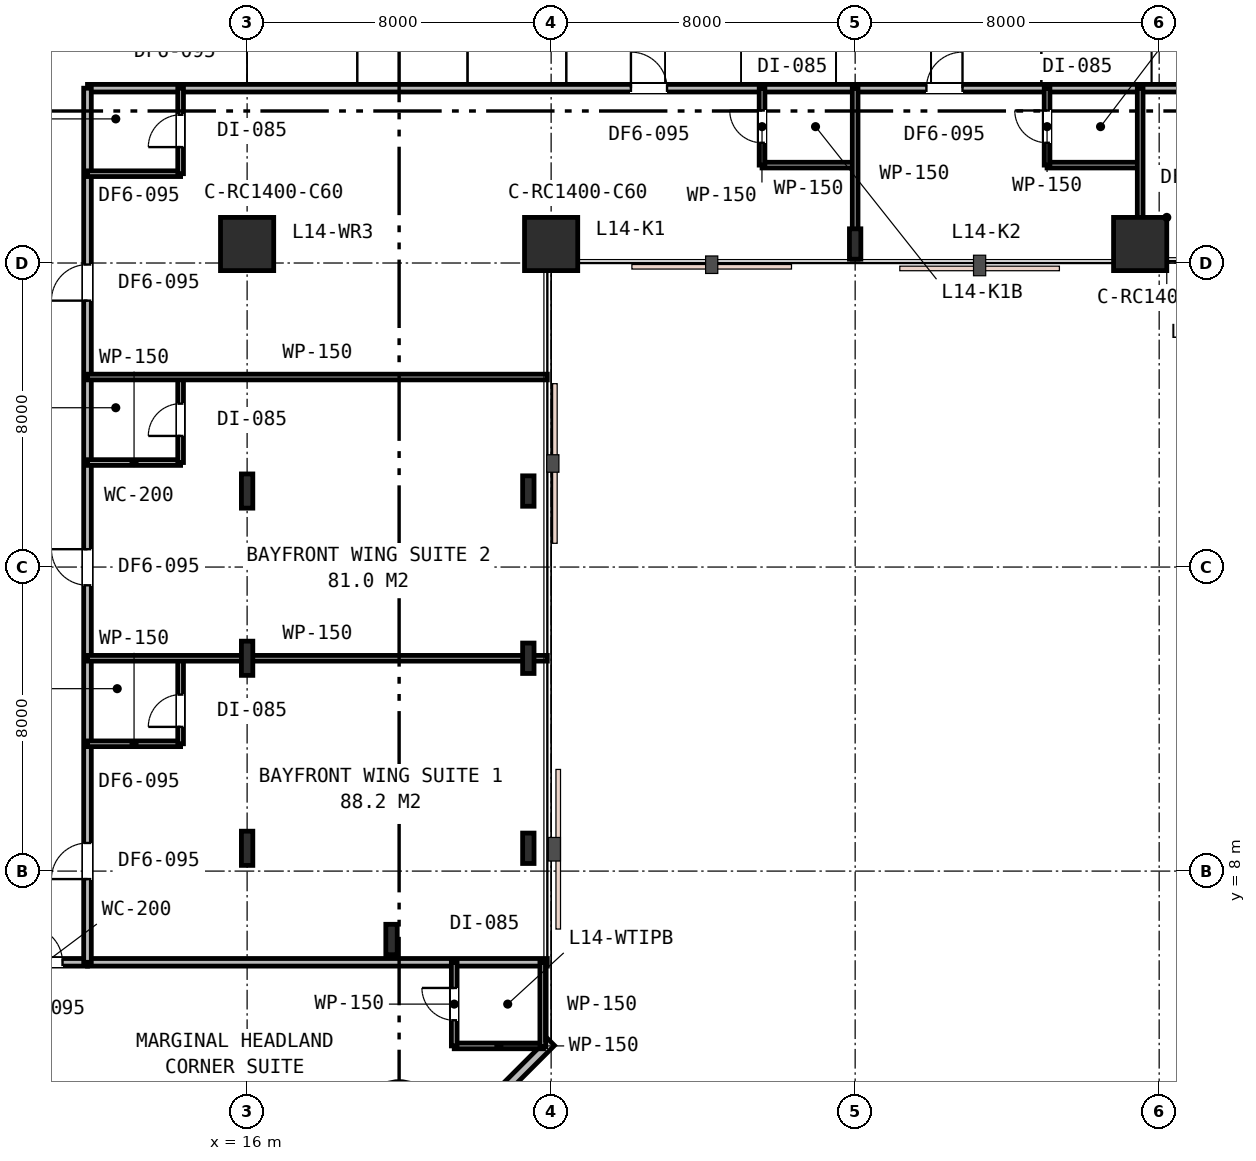
"""IFC4 building model, lengths in metres.
Left out: names, types, materials, properties, quantities, classifications, styles, units other than length and angle.
Written with IfcOpenShell. Run it as: python <this file> out.ifc"""

import sys

from ifc_helpers import new_model, si_unit, direction, frame, frame_2d, origin, origin_2d, place, context, subcontext, project, spatial, rectangle, i_section, extrude, element, fill, save


model = new_model("IFC4")
c1 = context("Model", 3, precision=1e-05, world=origin(), true_north=direction((0.0, 1.0)))
c2 = subcontext(c1, "Body", "Model", "MODEL_VIEW")
j1 = project(units=[si_unit("LENGTHUNIT", "METRE"), si_unit("PLANEANGLEUNIT", "RADIAN")], contexts=[c1])
p1 = place(None, origin())
s1 = spatial("IfcSite", under=j1, at=p1, CompositionType="ELEMENT")
p2 = place(p1, origin())
s2 = spatial("IfcBuilding", under=s1, at=p2, CompositionType="ELEMENT")
p3 = place(p2, frame((0.0, 0.0, 58.2)))
s3 = spatial("IfcBuildingStorey", under=s2, at=p3, CompositionType="ELEMENT", Elevation=58.2)
for number, where, z_axis, x_axis in (
    (1, (16.0, 24.5, 0.0), (0.0, 0.0, 1.0), (1.0, 0.0, 0.0)),
    (2, (24.0, 24.5, 0.0), (0.0, 0.0, 1.0), (1.0, 0.0, 0.0)),
):
    element("IfcColumn", number, at=place(p3, frame(where, z_axis=z_axis, x_axis=x_axis)), inside=s3, PredefinedType="COLUMN", context=c2, shape_type="SweptSolid", body=[
        extrude(rectangle(XDim=1.4, YDim=1.4, at=origin_2d()), origin(), (0.0, 0.0, 1.0), 3.6),
    ])
p4 = place(p3, frame((32.0, 24.5, 0.0), z_axis=(0.0, 0.0, 1.0), x_axis=(1.0, 0.0, 0.0)))
e3 = element("IfcColumn", 3, at=p4, inside=s3, PredefinedType="COLUMN", context=c2, shape_type="SweptSolid", body=[
    extrude(i_section(OverallWidth=0.3, OverallDepth=0.8, WebThickness=0.018, FlangeThickness=0.033, FilletRadius=0.03, at=origin_2d()), origin(), (0.0, 0.0, 1.0), 3.6),
])
p5 = place(p3, frame((39.5, 24.5, 0.0), z_axis=(0.0, 0.0, 1.0), x_axis=(1.0, 0.0, 0.0)))
e4 = element("IfcColumn", 4, at=p5, inside=s3, PredefinedType="COLUMN", context=c2, shape_type="SweptSolid", body=[
    extrude(rectangle(XDim=1.4, YDim=1.4, at=origin_2d()), origin(), (0.0, 0.0, 1.0), 3.6),
])
for number, where, z_axis, x_axis in (
    (5, (19.8, 6.2, 0.0), (0.0, 0.0, 1.0), (1.0, 0.0, 0.0)),
    (6, (23.4, 8.6, 0.0), (0.0, 0.0, 1.0), (1.0, 0.0, 0.0)),
    (7, (23.4, 13.6, 0.0), (0.0, 0.0, 1.0), (1.0, 0.0, 0.0)),
    (8, (23.4, 18.0, 0.0), (0.0, 0.0, 1.0), (1.0, 0.0, 0.0)),
):
    element("IfcColumn", number, at=place(p3, frame(where, z_axis=z_axis, x_axis=x_axis)), inside=s3, PredefinedType="COLUMN", context=c2, shape_type="SweptSolid", body=[
        extrude(i_section(OverallWidth=0.3, OverallDepth=0.8, WebThickness=0.018, FlangeThickness=0.033, FilletRadius=0.03, at=origin_2d()), origin(), (0.0, 0.0, 1.0), 3.6),
    ])
for number, where, z_axis, x_axis in (
    (9, (16.0, 8.6, 0.0), (0.0, 0.0, 1.0), (1.0, 0.0, 0.0)),
    (10, (16.0, 13.6, 0.0), (0.0, 0.0, 1.0), (1.0, 0.0, 0.0)),
    (11, (16.0, 18.0, 0.0), (0.0, 0.0, 1.0), (1.0, 0.0, 0.0)),
):
    element("IfcColumn", number, at=place(p3, frame(where, z_axis=z_axis, x_axis=x_axis)), inside=s3, PredefinedType="COLUMN", context=c2, shape_type="SweptSolid", body=[
        extrude(i_section(OverallWidth=0.3, OverallDepth=0.9, WebThickness=0.018, FlangeThickness=0.035, FilletRadius=0.03, at=origin_2d()), origin(), (0.0, 0.0, 1.0), 3.6),
    ])
p6 = place(p3, frame((20.5, 0.0, 0.0), z_axis=(0.0, 0.0, 1.0), x_axis=(0.707106781187, 0.707106781187, 0.0)))
e12 = element("IfcWall", 12, at=p6, inside=s3, PredefinedType="STANDARD", context=c2, shape_type="SweptSolid", body=[
    extrude(rectangle(XDim=4.95, YDim=0.25, at=frame_2d((2.475, 0.0))), origin(), (0.0, 0.0, 1.0), 3.33),
])
p7 = place(p6, frame((1.465, 0.0, 0.75)))
e13 = element("IfcOpeningElement", 13, at=p7, cuts=e12, PredefinedType="OPENING", context=c2, shape_type="SweptSolid", body=[
    extrude(rectangle(XDim=1.8, YDim=1.85, at=frame_2d((0.9, 0.925))), frame((0.0, 0.135, 0.0), z_axis=(0.0, -1.0, 0.0), x_axis=(1.0, 0.0, 0.0)), (0.0, 0.0, 1.0), 0.27),
])
p8 = place(p3, frame((11.8, 28.6, 0.0), z_axis=(0.0, 0.0, 1.0), x_axis=(1.0, 0.0, 0.0)))
e14 = element("IfcWall", 14, at=p8, inside=s3, PredefinedType="PARTITIONING", context=c2, shape_type="SweptSolid", body=[
    extrude(rectangle(XDim=38.6, YDim=0.2, at=frame_2d((19.3, 0.0))), origin(), (0.0, 0.0, 1.0), 2.82),
])
p9 = place(p8, frame((14.3, 0.0, 0.0)))
e15 = element("IfcOpeningElement", 15, at=p9, cuts=e14, PredefinedType="OPENING", context=c2, shape_type="SweptSolid", body=[
    extrude(rectangle(XDim=0.95, YDim=2.15, at=frame_2d((0.475, 1.075))), frame((0.0, 0.11, 0.0), z_axis=(0.0, -1.0, 0.0), x_axis=(1.0, 0.0, 0.0)), (0.0, 0.0, 1.0), 0.22),
])
p10 = place(p8, frame((22.075, 0.0, 0.0)))
e16 = element("IfcOpeningElement", 16, at=p10, cuts=e14, PredefinedType="OPENING", context=c2, shape_type="SweptSolid", body=[
    extrude(rectangle(XDim=0.95, YDim=2.15, at=frame_2d((0.475, 1.075))), frame((0.0, 0.11, 0.0), z_axis=(0.0, -1.0, 0.0), x_axis=(1.0, 0.0, 0.0)), (0.0, 0.0, 1.0), 0.22),
])
p11 = place(p8, frame((28.829, 0.0, 0.0)))
e17 = element("IfcOpeningElement", 17, at=p11, cuts=e14, PredefinedType="OPENING", context=c2, shape_type="SweptSolid", body=[
    extrude(rectangle(XDim=0.95, YDim=2.15, at=frame_2d((0.475, 1.075))), frame((0.0, 0.11, 0.0), z_axis=(0.0, -1.0, 0.0), x_axis=(1.0, 0.0, 0.0)), (0.0, 0.0, 1.0), 0.22),
])
p12 = place(p8, frame((34.669, 0.0, 0.0)))
e18 = element("IfcOpeningElement", 18, at=p12, cuts=e14, PredefinedType="OPENING", context=c2, shape_type="SweptSolid", body=[
    extrude(rectangle(XDim=0.95, YDim=2.15, at=frame_2d((0.475, 1.075))), frame((0.0, 0.11, 0.0), z_axis=(0.0, -1.0, 0.0), x_axis=(1.0, 0.0, 0.0)), (0.0, 0.0, 1.0), 0.22),
])
p13 = place(p3, frame((29.55, 26.576, 0.0), z_axis=(0.0, 0.0, 1.0), x_axis=(1.0, 0.0, 0.0)))
e19 = element("IfcWall", 19, at=p13, inside=s3, PredefinedType="PARTITIONING", context=c2, shape_type="SweptSolid", body=[
    extrude(rectangle(XDim=2.45, YDim=0.15, at=frame_2d((1.225, 0.0))), origin(), (0.0, 0.0, 1.0), 3.33),
])
p14 = place(p3, frame((29.55, 26.576, 0.0), z_axis=(0.0, 0.0, 1.0), x_axis=(0.0, 1.0, 0.0)))
e20 = element("IfcWall", 20, at=p14, inside=s3, PredefinedType="PARTITIONING", context=c2, shape_type="SweptSolid", body=[
    extrude(rectangle(XDim=2.024, YDim=0.15, at=frame_2d((1.012, 0.0))), origin(), (0.0, 0.0, 1.0), 3.33),
])
p15 = place(p14, frame((0.587, 0.0, 0.0)))
e21 = element("IfcOpeningElement", 21, at=p15, cuts=e20, PredefinedType="OPENING", context=c2, shape_type="SweptSolid", body=[
    extrude(rectangle(XDim=0.85, YDim=2.15, at=frame_2d((0.425, 1.075))), frame((0.0, 0.085, 0.0), z_axis=(0.0, -1.0, 0.0), x_axis=(1.0, 0.0, 0.0)), (0.0, 0.0, 1.0), 0.17),
])
p16 = place(p3, frame((32.0, 28.6, 0.0), z_axis=(0.0, 0.0, 1.0), x_axis=(0.0, -1.0, 0.0)))
e22 = element("IfcWall", 22, at=p16, inside=s3, PredefinedType="PARTITIONING", context=c2, shape_type="SweptSolid", body=[
    extrude(rectangle(XDim=4.5, YDim=0.15, at=frame_2d((2.25, 0.0))), origin(), (0.0, 0.0, 1.0), 2.93),
])
p17 = place(p3, frame((37.05, 26.576, 0.0), z_axis=(0.0, 0.0, 1.0), x_axis=(1.0, 0.0, 0.0)))
e23 = element("IfcWall", 23, at=p17, inside=s3, PredefinedType="PARTITIONING", context=c2, shape_type="SweptSolid", body=[
    extrude(rectangle(XDim=2.45, YDim=0.15, at=frame_2d((1.225, 0.0))), origin(), (0.0, 0.0, 1.0), 2.82),
])
p18 = place(p3, frame((37.05, 26.576, 0.0), z_axis=(0.0, 0.0, 1.0), x_axis=(0.0, 1.0, 0.0)))
e24 = element("IfcWall", 24, at=p18, inside=s3, PredefinedType="PARTITIONING", context=c2, shape_type="SweptSolid", body=[
    extrude(rectangle(XDim=2.024, YDim=0.15, at=frame_2d((1.012, 0.0))), origin(), (0.0, 0.0, 1.0), 2.96),
])
p19 = place(p18, frame((0.587, 0.0, 0.0)))
e25 = element("IfcOpeningElement", 25, at=p19, cuts=e24, PredefinedType="OPENING", context=c2, shape_type="SweptSolid", body=[
    extrude(rectangle(XDim=0.85, YDim=2.15, at=frame_2d((0.425, 1.075))), frame((0.0, 0.085, 0.0), z_axis=(0.0, -1.0, 0.0), x_axis=(1.0, 0.0, 0.0)), (0.0, 0.0, 1.0), 0.17),
])
p20 = place(p3, frame((39.5, 28.6, 0.0), z_axis=(0.0, 0.0, 1.0), x_axis=(0.0, -1.0, 0.0)))
e26 = element("IfcWall", 26, at=p20, inside=s3, PredefinedType="PARTITIONING", context=c2, shape_type="SweptSolid", body=[
    extrude(rectangle(XDim=4.5, YDim=0.15, at=frame_2d((2.25, 0.0))), origin(), (0.0, 0.0, 1.0), 2.82),
])
p21 = place(p3, frame((11.8, 5.6, 0.0), z_axis=(0.0, 0.0, 1.0), x_axis=(1.0, 0.0, 0.0)))
e27 = element("IfcWall", 27, at=p21, inside=s3, PredefinedType="PARTITIONING", context=c2, shape_type="SweptSolid", body=[
    extrude(rectangle(XDim=12.1, YDim=0.2, at=frame_2d((6.05, 0.0))), origin(), (0.0, 0.0, 1.0), 2.82),
])
p22 = place(p3, frame((9.6, 5.6, 0.0), z_axis=(0.0, 0.0, 1.0), x_axis=(1.0, 0.0, 0.0)))
e28 = element("IfcWall", 28, at=p22, inside=s3, PredefinedType="PARTITIONING", context=c2, shape_type="SweptSolid", body=[
    extrude(rectangle(XDim=2.2, YDim=0.2, at=frame_2d((1.1, 0.0))), origin(), (0.0, 0.0, 1.0), 3.33),
])
p23 = place(p22, frame((0.593, 0.0, 0.0)))
e29 = element("IfcOpeningElement", 29, at=p23, cuts=e28, PredefinedType="OPENING", context=c2, shape_type="SweptSolid", body=[
    extrude(rectangle(XDim=0.95, YDim=2.15, at=frame_2d((0.475, 1.075))), frame((0.0, 0.11, 0.0), z_axis=(0.0, -1.0, 0.0), x_axis=(1.0, 0.0, 0.0)), (0.0, 0.0, 1.0), 0.22),
])
p24 = place(p3, frame((21.45, 3.4, 0.0), z_axis=(0.0, 0.0, 1.0), x_axis=(1.0, 0.0, 0.0)))
e30 = element("IfcWall", 30, at=p24, inside=s3, PredefinedType="PARTITIONING", context=c2, shape_type="SweptSolid", body=[
    extrude(rectangle(XDim=2.35, YDim=0.15, at=frame_2d((1.175, 0.0))), origin(), (0.0, 0.0, 1.0), 3.33),
])
p25 = place(p3, frame((21.45, 3.4, 0.0), z_axis=(0.0, 0.0, 1.0), x_axis=(0.0, 1.0, 0.0)))
e31 = element("IfcWall", 31, at=p25, inside=s3, PredefinedType="PARTITIONING", context=c2, shape_type="SweptSolid", body=[
    extrude(rectangle(XDim=2.2, YDim=0.15, at=frame_2d((1.1, 0.0))), origin(), (0.0, 0.0, 1.0), 3.33),
])
p26 = place(p25, frame((0.675, 0.0, 0.0)))
e32 = element("IfcOpeningElement", 32, at=p26, cuts=e31, PredefinedType="OPENING", context=c2, shape_type="SweptSolid", body=[
    extrude(rectangle(XDim=0.85, YDim=2.15, at=frame_2d((0.425, 1.075))), frame((0.0, 0.085, 0.0), z_axis=(0.0, -1.0, 0.0), x_axis=(1.0, 0.0, 0.0)), (0.0, 0.0, 1.0), 0.17),
])
p27 = place(p3, frame((23.78, 5.6, 0.0), z_axis=(0.0, 0.0, 1.0), x_axis=(0.0, -1.0, 0.0)))
e33 = element("IfcWall", 33, at=p27, inside=s3, PredefinedType="PARTITIONING", context=c2, shape_type="SweptSolid", body=[
    extrude(rectangle(XDim=2.22, YDim=0.15, at=frame_2d((1.11, 0.0))), origin(), (0.0, 0.0, 1.0), 3.33),
])
p28 = place(p3, frame((11.8, 5.6, 0.0), z_axis=(0.0, 0.0, 1.0), x_axis=(0.0, 1.0, 0.0)))
e34 = element("IfcWall", 34, at=p28, inside=s3, PredefinedType="PARTITIONING", context=c2, shape_type="SweptSolid", body=[
    extrude(rectangle(XDim=23.0, YDim=0.2, at=frame_2d((11.5, 0.0))), origin(), (0.0, 0.0, 1.0), 2.82),
])
p29 = place(p28, frame((2.19, 0.0, 0.0)))
e35 = element("IfcOpeningElement", 35, at=p29, cuts=e34, PredefinedType="OPENING", context=c2, shape_type="SweptSolid", body=[
    extrude(rectangle(XDim=0.95, YDim=2.15, at=frame_2d((0.475, 1.075))), frame((0.0, 0.11, 0.0), z_axis=(0.0, -1.0, 0.0), x_axis=(1.0, 0.0, 0.0)), (0.0, 0.0, 1.0), 0.22),
])
p30 = place(p28, frame((9.92, 0.0, 0.0)))
e36 = element("IfcOpeningElement", 36, at=p30, cuts=e34, PredefinedType="OPENING", context=c2, shape_type="SweptSolid", body=[
    extrude(rectangle(XDim=0.95, YDim=2.15, at=frame_2d((0.475, 1.075))), frame((0.0, 0.11, 0.0), z_axis=(0.0, -1.0, 0.0), x_axis=(1.0, 0.0, 0.0)), (0.0, 0.0, 1.0), 0.22),
])
p31 = place(p28, frame((17.41, 0.0, 0.0)))
e37 = element("IfcOpeningElement", 37, at=p31, cuts=e34, PredefinedType="OPENING", context=c2, shape_type="SweptSolid", body=[
    extrude(rectangle(XDim=0.95, YDim=2.15, at=frame_2d((0.475, 1.075))), frame((0.0, 0.11, 0.0), z_axis=(0.0, -1.0, 0.0), x_axis=(1.0, 0.0, 0.0)), (0.0, 0.0, 1.0), 0.22),
])
p32 = place(p3, frame((11.8, 11.35, 0.0), z_axis=(0.0, 0.0, 1.0), x_axis=(1.0, 0.0, 0.0)))
e38 = element("IfcWall", 38, at=p32, inside=s3, PredefinedType="PARTITIONING", context=c2, shape_type="SweptSolid", body=[
    extrude(rectangle(XDim=2.45, YDim=0.15, at=frame_2d((1.225, 0.0))), origin(), (0.0, 0.0, 1.0), 2.96),
])
p33 = place(p3, frame((14.25, 11.35, 0.0), z_axis=(0.0, 0.0, 1.0), x_axis=(0.0, 1.0, 0.0)))
e39 = element("IfcWall", 39, at=p33, inside=s3, PredefinedType="PARTITIONING", context=c2, shape_type="SweptSolid", body=[
    extrude(rectangle(XDim=2.25, YDim=0.15, at=frame_2d((1.125, 0.0))), origin(), (0.0, 0.0, 1.0), 2.82),
])
p34 = place(p33, frame((0.444, 0.0, 0.0)))
e40 = element("IfcOpeningElement", 40, at=p34, cuts=e39, PredefinedType="OPENING", context=c2, shape_type="SweptSolid", body=[
    extrude(rectangle(XDim=0.85, YDim=2.15, at=frame_2d((0.425, 1.075))), frame((0.0, 0.085, 0.0), z_axis=(0.0, -1.0, 0.0), x_axis=(1.0, 0.0, 0.0)), (0.0, 0.0, 1.0), 0.17),
])
p35 = place(p3, frame((11.8, 13.6, 0.0), z_axis=(0.0, 0.0, 1.0), x_axis=(1.0, 0.0, 0.0)))
e41 = element("IfcWall", 41, at=p35, inside=s3, PredefinedType="PARTITIONING", context=c2, shape_type="SweptSolid", body=[
    extrude(rectangle(XDim=12.1, YDim=0.15, at=frame_2d((6.05, 0.0))), origin(), (0.0, 0.0, 1.0), 2.82),
])
p36 = place(p3, frame((11.8, 18.75, 0.0), z_axis=(0.0, 0.0, 1.0), x_axis=(1.0, 0.0, 0.0)))
e42 = element("IfcWall", 42, at=p36, inside=s3, PredefinedType="PARTITIONING", context=c2, shape_type="SweptSolid", body=[
    extrude(rectangle(XDim=2.45, YDim=0.15, at=frame_2d((1.225, 0.0))), origin(), (0.0, 0.0, 1.0), 3.33),
])
p37 = place(p3, frame((14.25, 18.75, 0.0), z_axis=(0.0, 0.0, 1.0), x_axis=(0.0, 1.0, 0.0)))
e43 = element("IfcWall", 43, at=p37, inside=s3, PredefinedType="PARTITIONING", context=c2, shape_type="SweptSolid", body=[
    extrude(rectangle(XDim=2.25, YDim=0.15, at=frame_2d((1.125, 0.0))), origin(), (0.0, 0.0, 1.0), 3.33),
])
p38 = place(p37, frame((0.7, 0.0, 0.0)))
e44 = element("IfcOpeningElement", 44, at=p38, cuts=e43, PredefinedType="OPENING", context=c2, shape_type="SweptSolid", body=[
    extrude(rectangle(XDim=0.85, YDim=2.15, at=frame_2d((0.425, 1.075))), frame((0.0, 0.085, 0.0), z_axis=(0.0, -1.0, 0.0), x_axis=(1.0, 0.0, 0.0)), (0.0, 0.0, 1.0), 0.17),
])
p39 = place(p3, frame((11.8, 21.0, 0.0), z_axis=(0.0, 0.0, 1.0), x_axis=(1.0, 0.0, 0.0)))
e45 = element("IfcWall", 45, at=p39, inside=s3, PredefinedType="PARTITIONING", context=c2, shape_type="SweptSolid", body=[
    extrude(rectangle(XDim=12.1, YDim=0.15, at=frame_2d((6.05, 0.0))), origin(), (0.0, 0.0, 1.0), 2.82),
])
p40 = place(p3, frame((11.8, 26.35, 0.0), z_axis=(0.0, 0.0, 1.0), x_axis=(1.0, 0.0, 0.0)))
e46 = element("IfcWall", 46, at=p40, inside=s3, PredefinedType="PARTITIONING", context=c2, shape_type="SweptSolid", body=[
    extrude(rectangle(XDim=2.45, YDim=0.15, at=frame_2d((1.225, 0.0))), origin(), (0.0, 0.0, 1.0), 3.33),
])
p41 = place(p3, frame((14.25, 26.35, 0.0), z_axis=(0.0, 0.0, 1.0), x_axis=(0.0, 1.0, 0.0)))
e47 = element("IfcWall", 47, at=p41, inside=s3, PredefinedType="PARTITIONING", context=c2, shape_type="SweptSolid", body=[
    extrude(rectangle(XDim=2.25, YDim=0.15, at=frame_2d((1.125, 0.0))), origin(), (0.0, 0.0, 1.0), 3.33),
])
p42 = place(p41, frame((0.7, 0.0, 0.0)))
e48 = element("IfcOpeningElement", 48, at=p42, cuts=e47, PredefinedType="OPENING", context=c2, shape_type="SweptSolid", body=[
    extrude(rectangle(XDim=0.85, YDim=2.15, at=frame_2d((0.425, 1.075))), frame((0.0, 0.085, 0.0), z_axis=(0.0, -1.0, 0.0), x_axis=(1.0, 0.0, 0.0)), (0.0, 0.0, 1.0), 0.17),
])
p43 = place(p9, origin())
e49 = element("IfcDoor", 49, at=p43, inside=s3, OperationType="SINGLE_SWING_LEFT", PredefinedType="DOOR", context=c2, shape_type="SweptSolid", body=[
    extrude(rectangle(XDim=0.95, YDim=2.15, at=frame_2d((0.475, 1.075))), frame((0.0, 0.025, 0.0), z_axis=(0.0, -1.0, 0.0), x_axis=(1.0, 0.0, 0.0)), (0.0, 0.0, 1.0), 0.05),
])
fill(e15, e49)
p44 = place(p15, origin())
e50 = element("IfcDoor", 50, at=p44, inside=s3, OperationType="SINGLE_SWING_RIGHT", PredefinedType="DOOR", context=c2, shape_type="SweptSolid", body=[
    extrude(rectangle(XDim=0.85, YDim=2.15, at=frame_2d((0.425, 1.075))), frame((0.0, 0.025, 0.0), z_axis=(0.0, -1.0, 0.0), x_axis=(1.0, 0.0, 0.0)), (0.0, 0.0, 1.0), 0.05),
])
fill(e21, e50)
p45 = place(p10, origin())
e51 = element("IfcDoor", 51, at=p45, inside=s3, OperationType="SINGLE_SWING_RIGHT", PredefinedType="DOOR", context=c2, shape_type="SweptSolid", body=[
    extrude(rectangle(XDim=0.95, YDim=2.15, at=frame_2d((0.475, 1.075))), frame((0.0, 0.025, 0.0), z_axis=(0.0, -1.0, 0.0), x_axis=(1.0, 0.0, 0.0)), (0.0, 0.0, 1.0), 0.05),
])
fill(e16, e51)
p46 = place(p19, origin())
e52 = element("IfcDoor", 52, at=p46, inside=s3, OperationType="SINGLE_SWING_RIGHT", PredefinedType="DOOR", context=c2, shape_type="SweptSolid", body=[
    extrude(rectangle(XDim=0.85, YDim=2.15, at=frame_2d((0.425, 1.075))), frame((0.0, 0.025, 0.0), z_axis=(0.0, -1.0, 0.0), x_axis=(1.0, 0.0, 0.0)), (0.0, 0.0, 1.0), 0.05),
])
fill(e25, e52)
p47 = place(p23, origin())
e53 = element("IfcDoor", 53, at=p47, inside=s3, OperationType="SINGLE_SWING_LEFT", PredefinedType="DOOR", context=c2, shape_type="SweptSolid", body=[
    extrude(rectangle(XDim=0.95, YDim=2.15, at=frame_2d((0.475, 1.075))), frame((0.0, 0.025, 0.0), z_axis=(0.0, -1.0, 0.0), x_axis=(1.0, 0.0, 0.0)), (0.0, 0.0, 1.0), 0.05),
])
fill(e29, e53)
p48 = place(p26, origin())
e54 = element("IfcDoor", 54, at=p48, inside=s3, OperationType="SINGLE_SWING_RIGHT", PredefinedType="DOOR", context=c2, shape_type="SweptSolid", body=[
    extrude(rectangle(XDim=0.85, YDim=2.15, at=frame_2d((0.425, 1.075))), frame((0.0, 0.025, 0.0), z_axis=(0.0, -1.0, 0.0), x_axis=(1.0, 0.0, 0.0)), (0.0, 0.0, 1.0), 0.05),
])
fill(e32, e54)
p49 = place(p29, origin())
e55 = element("IfcDoor", 55, at=p49, inside=s3, OperationType="SINGLE_SWING_LEFT", PredefinedType="DOOR", context=c2, shape_type="SweptSolid", body=[
    extrude(rectangle(XDim=0.95, YDim=2.15, at=frame_2d((0.475, 1.075))), frame((0.0, 0.025, 0.0), z_axis=(0.0, -1.0, 0.0), x_axis=(1.0, 0.0, 0.0)), (0.0, 0.0, 1.0), 0.05),
])
fill(e35, e55)
p50 = place(p34, origin())
e56 = element("IfcDoor", 56, at=p50, inside=s3, OperationType="SINGLE_SWING_LEFT", PredefinedType="DOOR", context=c2, shape_type="SweptSolid", body=[
    extrude(rectangle(XDim=0.85, YDim=2.15, at=frame_2d((0.425, 1.075))), frame((0.0, 0.025, 0.0), z_axis=(0.0, -1.0, 0.0), x_axis=(1.0, 0.0, 0.0)), (0.0, 0.0, 1.0), 0.05),
])
fill(e40, e56)
p51 = place(p30, origin())
e57 = element("IfcDoor", 57, at=p51, inside=s3, OperationType="SINGLE_SWING_RIGHT", PredefinedType="DOOR", context=c2, shape_type="SweptSolid", body=[
    extrude(rectangle(XDim=0.95, YDim=2.15, at=frame_2d((0.475, 1.075))), frame((0.0, 0.025, 0.0), z_axis=(0.0, -1.0, 0.0), x_axis=(1.0, 0.0, 0.0)), (0.0, 0.0, 1.0), 0.05),
])
fill(e36, e57)
p52 = place(p38, origin())
e58 = element("IfcDoor", 58, at=p52, inside=s3, OperationType="SINGLE_SWING_LEFT", PredefinedType="DOOR", context=c2, shape_type="SweptSolid", body=[
    extrude(rectangle(XDim=0.85, YDim=2.15, at=frame_2d((0.425, 1.075))), frame((0.0, 0.025, 0.0), z_axis=(0.0, -1.0, 0.0), x_axis=(1.0, 0.0, 0.0)), (0.0, 0.0, 1.0), 0.05),
])
fill(e44, e58)
p53 = place(p31, origin())
e59 = element("IfcDoor", 59, at=p53, inside=s3, OperationType="SINGLE_SWING_LEFT", PredefinedType="DOOR", context=c2, shape_type="SweptSolid", body=[
    extrude(rectangle(XDim=0.95, YDim=2.15, at=frame_2d((0.475, 1.075))), frame((0.0, 0.025, 0.0), z_axis=(0.0, -1.0, 0.0), x_axis=(1.0, 0.0, 0.0)), (0.0, 0.0, 1.0), 0.05),
])
fill(e37, e59)
p54 = place(p42, origin())
e60 = element("IfcDoor", 60, at=p54, inside=s3, OperationType="SINGLE_SWING_LEFT", PredefinedType="DOOR", context=c2, shape_type="SweptSolid", body=[
    extrude(rectangle(XDim=0.85, YDim=2.15, at=frame_2d((0.425, 1.075))), frame((0.0, 0.025, 0.0), z_axis=(0.0, -1.0, 0.0), x_axis=(1.0, 0.0, 0.0)), (0.0, 0.0, 1.0), 0.05),
])
fill(e48, e60)
save(model, sys.argv[1])
